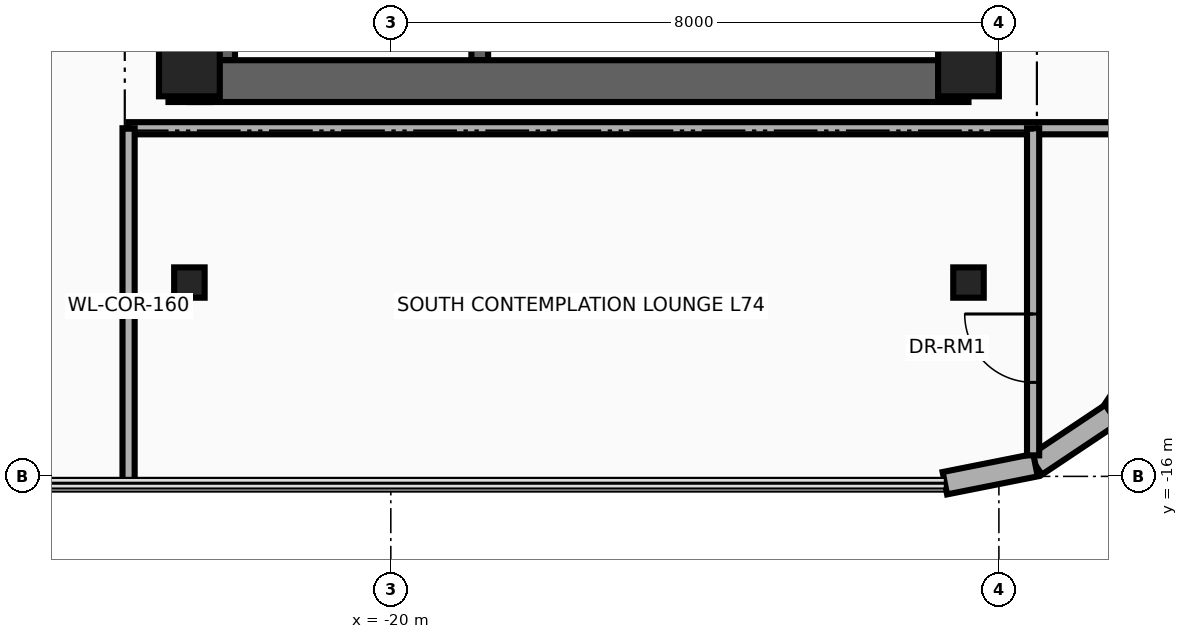
"""IFC4 building model, lengths in metres.
Left out: names, types, materials, properties, quantities, classifications, styles, units other than length and angle.
Written with IfcOpenShell. Run it as: python <this file> out.ifc"""

import sys

from ifc_helpers import new_model, si_unit, direction, frame, frame_2d, origin, origin_2d, place, context, subcontext, project, spatial, rectangle, i_section, extrude, source, transform, mapped, element, fill, save


model = new_model("IFC4")
c1 = context("Model", 3, precision=1e-05, world=origin(), true_north=direction((0.0, 1.0)))
c2 = subcontext(c1, "Body", "Model", "MODEL_VIEW")
j1 = project(units=[si_unit("LENGTHUNIT", "METRE"), si_unit("PLANEANGLEUNIT", "RADIAN")], contexts=[c1])
p1 = place(None, origin())
s1 = spatial("IfcSite", under=j1, at=p1, CompositionType="ELEMENT")
p2 = place(p1, origin())
s2 = spatial("IfcBuilding", under=s1, at=p2, CompositionType="ELEMENT")
p3 = place(p2, frame((0.0, 0.0, 283.5)))
s3 = spatial("IfcBuildingStorey", under=s2, at=p3, CompositionType="ELEMENT", Elevation=283.5)
for number, where, z_axis, x_axis in (
    (1, (-22.16, -10.525, 0.0), (0.0, 0.0, 1.0), (0.0, 1.0, 0.0)),
    (2, (-18.83, -10.525, 0.0), (0.0, 0.0, 1.0), (0.0, 1.0, 0.0)),
):
    element("IfcWall", number, at=place(p3, frame(where, z_axis=z_axis, x_axis=x_axis)), inside=s3, PredefinedType="SHEAR", context=c2, shape_type="SweptSolid", body=[
        extrude(rectangle(XDim=8.745, YDim=0.22, at=frame_2d((4.373, 0.0))), origin(), (0.0, 0.0, 1.0), 3.26),
    ])
p4 = place(p3, frame((-22.65, -11.075, 0.0), z_axis=(0.0, 0.0, 1.0), x_axis=(0.0, 1.0, 0.0)))
e3 = element("IfcWall", 3, at=p4, inside=s3, PredefinedType="SHEAR", context=c2, shape_type="SweptSolid", body=[
    extrude(rectangle(XDim=22.15, YDim=0.55, at=frame_2d((11.075, 0.0))), origin(), (0.0, 0.0, 1.0), 3.26),
])
p5 = place(p3, frame((-22.65, -10.8, 0.0), z_axis=(0.0, 0.0, 1.0), x_axis=(1.0, 0.0, 0.0)))
e4 = element("IfcWall", 4, at=p5, inside=s3, PredefinedType="SHEAR", context=c2, shape_type="SweptSolid", body=[
    extrude(rectangle(XDim=10.25, YDim=0.55, at=frame_2d((5.125, 0.0))), origin(), (0.0, 0.0, 1.0), 3.26),
])
m1 = source(origin(), c2, "Body", "SweptSolid", [
    extrude(rectangle(XDim=0.8, YDim=0.8, at=origin_2d()), origin(), (0.0, 0.0, 1.0), 3.5),
])
for number, where, z_axis, x_axis in (
    (5, (-22.65, -10.6, 0.0), (0.0, 0.0, 1.0), (1.0, 0.0, 0.0)),
    (6, (-12.4, -10.6, 0.0), (0.0, 0.0, 1.0), (1.0, 0.0, 0.0)),
):
    element("IfcColumn", number, at=place(p3, frame(where, z_axis=z_axis, x_axis=x_axis)), inside=s3, PredefinedType="COLUMN", context=c2, shape_type="MappedRepresentation", body=[
        mapped(m1, transform((0.0, 0.0, 0.0), x_axis=(1.0, 0.0, 0.0), y_axis=(0.0, 1.0, 0.0), z_axis=(0.0, 0.0, 1.0), scale=1.0)),
    ])
m2 = source(origin(), c2, "Body", "SweptSolid", [
    extrude(i_section(OverallWidth=0.401, OverallDepth=0.399, WebThickness=0.025, FlangeThickness=0.04, at=origin_2d()), origin(), (0.0, 0.0, 1.0), 3.5),
])
for number, where, z_axis, x_axis in (
    (7, (-22.65, -13.45, 0.0), (0.0, 0.0, 1.0), (1.0, 0.0, 0.0)),
    (8, (-12.4, -13.45, 0.0), (0.0, 0.0, 1.0), (1.0, 0.0, 0.0)),
):
    element("IfcColumn", number, at=place(p3, frame(where, z_axis=z_axis, x_axis=x_axis)), inside=s3, PredefinedType="COLUMN", context=c2, shape_type="MappedRepresentation", body=[
        mapped(m2, transform((0.0, 0.0, 0.0), x_axis=(1.0, 0.0, 0.0), y_axis=(0.0, 1.0, 0.0), z_axis=(0.0, 0.0, 1.0), scale=1.0)),
    ])
for number, where, z_axis, x_axis in (
    (9, (-9.847, -14.182, 0.0), (0.0, 0.0, 1.0), (-0.556, -0.831, 0.0)),
    (10, (-10.517, -15.183, 0.0), (0.0, 0.0, 1.0), (-0.831, -0.556, 0.0)),
):
    element("IfcWall", number, at=place(p3, frame(where, z_axis=z_axis, x_axis=x_axis)), inside=s3, PredefinedType="SOLIDWALL", context=c2, shape_type="SweptSolid", body=[
        extrude(rectangle(XDim=1.205, YDim=0.3, at=frame_2d((0.603, 0.0))), origin(), (0.0, 0.0, 1.0), 3.26),
    ])
p6 = place(p3, frame((-11.518, -15.853, 0.0), z_axis=(0.0, 0.0, 1.0), x_axis=(-0.980765602568, -0.195189223115, 0.0)))
e11 = element("IfcWall", 11, at=p6, inside=s3, PredefinedType="SOLIDWALL", context=c2, shape_type="SweptSolid", body=[
    extrude(rectangle(XDim=1.216, YDim=0.3, at=frame_2d((0.608, 0.0))), origin(), (0.0, 0.0, 1.0), 3.26),
])
p7 = place(p3, frame((-23.45, -11.42, 0.0), z_axis=(0.0, 0.0, 1.0), x_axis=(1.0, 0.0, 0.0)))
e12 = element("IfcWall", 12, at=p7, inside=s3, PredefinedType="PARTITIONING", context=c2, shape_type="SweptSolid", body=[
    extrude(rectangle(XDim=13.84, YDim=0.16, at=frame_2d((6.92, 0.0))), origin(), (0.0, 0.0, 1.0), 2.634),
])
p8 = place(p3, frame((-23.45, -16.09, 0.0), z_axis=(0.0, 0.0, 1.0), x_axis=(0.0, 1.0, 0.0)))
e13 = element("IfcWall", 13, at=p8, inside=s3, PredefinedType="PARTITIONING", context=c2, shape_type="SweptSolid", body=[
    extrude(rectangle(XDim=4.67, YDim=0.16, at=frame_2d((2.335, 0.0))), origin(), (0.0, 0.0, 1.0), 3.26),
])
p9 = place(p3, frame((-11.55, -15.724, 0.0), z_axis=(0.0, 0.0, 1.0), x_axis=(0.0, 1.0, 0.0)))
e14 = element("IfcWall", 14, at=p9, inside=s3, PredefinedType="PARTITIONING", context=c2, shape_type="SweptSolid", body=[
    extrude(rectangle(XDim=4.304, YDim=0.16, at=frame_2d((2.152, 0.0))), origin(), (0.0, 0.0, 1.0), 3.26),
])
p10 = place(p9, frame((0.96, 0.0, 0.0)))
e15 = element("IfcOpeningElement", 15, at=p10, cuts=e14, PredefinedType="OPENING", context=c2, shape_type="SweptSolid", body=[
    extrude(rectangle(XDim=0.9, YDim=2.1, at=frame_2d((0.45, 1.05))), frame((0.0, 0.095, 0.0), z_axis=(0.0, -1.0, 0.0), x_axis=(1.0, 0.0, 0.0)), (0.0, 0.0, 1.0), 0.19),
])
p11 = place(p10, origin())
e16 = element("IfcDoor", 16, at=p11, inside=s3, OperationType="SINGLE_SWING_RIGHT", PredefinedType="DOOR", context=c2, shape_type="SweptSolid", body=[
    extrude(rectangle(XDim=0.9, YDim=2.1, at=frame_2d((0.45, 1.05))), frame((0.0, 0.025, 0.0), z_axis=(0.0, -1.0, 0.0), x_axis=(1.0, 0.0, 0.0)), (0.0, 0.0, 1.0), 0.05),
])
fill(e15, e16)
save(model, sys.argv[1])
